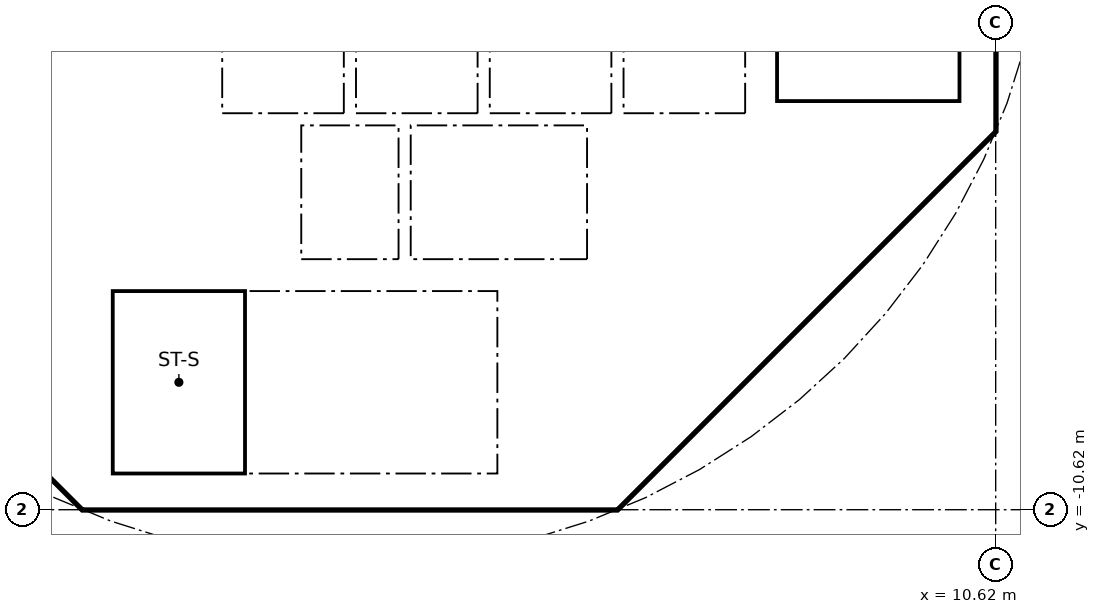
"""IFC4 building model, lengths in metres.
Left out: names, types, materials, properties, quantities, classifications, styles, units other than length and angle.
Written with IfcOpenShell. Run it as: python <this file> out.ifc"""

import sys

from ifc_helpers import new_model, si_unit, direction, frame, frame_2d, origin, place, context, subcontext, project, spatial, polyline, rectangle, outline, extrude, element, fill, save


model = new_model("IFC4")
c1 = context("Model", 3, precision=1e-05, world=origin(), true_north=direction((0.0, 1.0)))
c2 = subcontext(c1, "Body", "Model", "MODEL_VIEW")
j1 = project(units=[si_unit("LENGTHUNIT", "METRE"), si_unit("PLANEANGLEUNIT", "RADIAN")], contexts=[c1])
p1 = place(None, origin())
s1 = spatial("IfcSite", under=j1, at=p1, CompositionType="ELEMENT")
p2 = place(p1, origin())
s2 = spatial("IfcBuilding", under=s1, at=p2, CompositionType="ELEMENT")
p3 = place(p2, frame((0.0, 0.0, 252.9)))
s3 = spatial("IfcBuildingStorey", under=s2, at=p3, CompositionType="ELEMENT", Elevation=252.9)
p4 = place(p3, frame((-9.988, -4.613, 0.0), z_axis=(0.0, 0.0, 1.0), x_axis=(0.707106781187, -0.707106781187, 0.0)))
e1 = element("IfcWall", 1, at=p4, inside=s3, PredefinedType="SHEAR", context=c2, shape_type="SweptSolid", body=[
    extrude(rectangle(XDim=7.602, YDim=0.6, at=frame_2d((3.801, 0.0))), origin(), (0.0, 0.0, 1.0), 5.34),
])
p5 = place(p4, frame((6.151, 0.0, 0.0)))
e2 = element("IfcOpeningElement", 2, at=p5, cuts=e1, PredefinedType="OPENING", context=c2, shape_type="SweptSolid", body=[
    extrude(rectangle(XDim=1.1, YDim=2.1, at=frame_2d((0.55, 1.05))), frame((0.0, 0.31, 0.0), z_axis=(0.0, -1.0, 0.0), x_axis=(1.0, 0.0, 0.0)), (0.0, 0.0, 1.0), 0.62),
])
p6 = place(p3, frame((4.613, -9.988, 0.0), z_axis=(0.0, 0.0, 1.0), x_axis=(0.707106781187, 0.707106781187, 0.0)))
e3 = element("IfcWall", 3, at=p6, inside=s3, PredefinedType="SHEAR", context=c2, shape_type="SweptSolid", body=[
    extrude(rectangle(XDim=7.602, YDim=0.6, at=frame_2d((3.801, 0.0))), origin(), (0.0, 0.0, 1.0), 5.34),
])
p7 = place(p6, frame((3.201, 0.0, 0.0)))
e4 = element("IfcOpeningElement", 4, at=p7, cuts=e3, PredefinedType="OPENING", context=c2, shape_type="SweptSolid", body=[
    extrude(rectangle(XDim=1.2, YDim=2.1, at=frame_2d((0.6, 1.05))), frame((0.0, 0.31, 0.0), z_axis=(0.0, -1.0, 0.0), x_axis=(1.0, 0.0, 0.0)), (0.0, 0.0, 1.0), 0.62),
])
p8 = place(p3, frame((4.0, -10.025, 0.0), z_axis=(0.0, 0.0, 1.0), x_axis=(0.0, 1.0, 0.0)))
e5 = element("IfcWall", 5, at=p8, inside=s3, PredefinedType="SOLIDWALL", context=c2, shape_type="SweptSolid", body=[
    extrude(rectangle(XDim=3.0, YDim=0.2, at=frame_2d((1.5, 0.0))), origin(), (0.0, 0.0, 1.0), 5.34),
])
p9 = place(p8, frame((0.975, 0.0, 0.0)))
e6 = element("IfcOpeningElement", 6, at=p9, cuts=e5, PredefinedType="OPENING", context=c2, shape_type="SweptSolid", body=[
    extrude(rectangle(XDim=1.1, YDim=2.1, at=frame_2d((0.55, 1.05))), frame((0.0, 0.11, 0.0), z_axis=(0.0, -1.0, 0.0), x_axis=(1.0, 0.0, 0.0)), (0.0, 0.0, 1.0), 0.22),
])
p10 = place(p3, frame((4.0, -6.5, 0.0), z_axis=(0.0, 0.0, 1.0), x_axis=(0.0, 1.0, 0.0)))
e7 = element("IfcWall", 7, at=p10, inside=s3, PredefinedType="SOLIDWALL", context=c2, shape_type="SweptSolid", body=[
    extrude(rectangle(XDim=2.2, YDim=0.2, at=frame_2d((1.1, 0.0))), origin(), (0.0, 0.0, 1.0), 5.34),
])
p11 = place(p10, frame((0.55, 0.0, 0.0)))
e8 = element("IfcOpeningElement", 8, at=p11, cuts=e7, PredefinedType="OPENING", context=c2, shape_type="SweptSolid", body=[
    extrude(rectangle(XDim=1.1, YDim=2.1, at=frame_2d((0.55, 1.05))), frame((0.0, 0.11, 0.0), z_axis=(0.0, -1.0, 0.0), x_axis=(1.0, 0.0, 0.0)), (0.0, 0.0, 1.0), 0.22),
])
p12 = place(p3, frame((-4.0, -6.5, 0.0), z_axis=(0.0, 0.0, 1.0), x_axis=(0.0, 1.0, 0.0)))
e9 = element("IfcWall", 9, at=p12, inside=s3, PredefinedType="SOLIDWALL", context=c2, shape_type="SweptSolid", body=[
    extrude(rectangle(XDim=2.2, YDim=0.2, at=frame_2d((1.1, 0.0))), origin(), (0.0, 0.0, 1.0), 5.34),
])
p13 = place(p12, frame((0.65, 0.0, 0.0)))
e10 = element("IfcOpeningElement", 10, at=p13, cuts=e9, PredefinedType="OPENING", context=c2, shape_type="SweptSolid", body=[
    extrude(rectangle(XDim=0.9, YDim=2.1, at=frame_2d((0.45, 1.05))), frame((0.0, 0.11, 0.0), z_axis=(0.0, -1.0, 0.0), x_axis=(1.0, 0.0, 0.0)), (0.0, 0.0, 1.0), 0.22),
])
p14 = place(p3, origin())
e11 = element("IfcWall", 11, at=p14, inside=s3, PredefinedType="SHEAR", context=c2, shape_type="SweptSolid", body=[
    extrude(outline(polyline([(-4.152, -10.025), (4.152, -10.025), (4.401, -9.776), (4.825, -10.2), (4.401, -10.625), (-4.401, -10.625), (-4.825, -10.2), (-4.401, -9.776), (-4.152, -10.025)])), origin(), (0.0, 0.0, 1.0), 5.34),
])
p15 = place(p3, origin())
e12 = element("IfcWall", 12, at=p15, inside=s3, PredefinedType="SHEAR", context=c2, shape_type="SweptSolid", body=[
    extrude(outline(polyline([(9.776, -4.401), (10.025, -4.152), (10.025, -3.801), (10.025, 4.152), (9.776, 4.401), (10.2, 4.825), (10.625, 4.401), (10.625, -4.401), (10.2, -4.825), (9.776, -4.401)])), origin(), (0.0, 0.0, 1.0), 5.34),
])
for number, where, z_axis, x_axis in (
    (13, (-0.9, -6.5, 0.0), (0.0, 0.0, 1.0), (0.0, 1.0, 0.0)),
    (14, (0.9, -6.5, 0.0), (0.0, 0.0, 1.0), (0.0, 1.0, 0.0)),
):
    element("IfcWall", number, at=place(p3, frame(where, z_axis=z_axis, x_axis=x_axis)), inside=s3, PredefinedType="SOLIDWALL", context=c2, shape_type="SweptSolid", body=[
        extrude(rectangle(XDim=2.2, YDim=0.2, at=frame_2d((1.1, 0.0))), origin(), (0.0, 0.0, 1.0), 5.34),
    ])
p16 = place(p3, origin())
e15 = element("IfcWall", 15, at=p16, inside=s3, PredefinedType="SOLIDWALL", context=c2, shape_type="SweptSolid", body=[
    extrude(outline(polyline([(-6.7, -2.1), (-6.5, -2.1), (-6.5, -4.1), (-2.3, -4.1), (-2.3, -2.1), (-2.1, -2.1), (-2.1, -4.1), (-0.1, -4.1), (-0.1, -2.1), (0.1, -2.1), (0.1, -4.1), (2.1, -4.1), (2.1, -2.1), (2.3, -2.1), (2.3, -4.1), (4.3, -4.1), (4.3, -2.1), (4.5, -2.1), (4.5, -4.1), (6.5, -4.1), (6.5, -2.1), (6.7, -2.1), (6.7, -4.3), (-6.7, -4.3), (-6.7, -2.1)])), origin(), (0.0, 0.0, 1.0), 5.34),
])
p17 = place(p3, origin())
e16 = element("IfcWall", 16, at=p17, inside=s3, PredefinedType="SOLIDWALL", context=c2, shape_type="SweptSolid", body=[
    extrude(outline(polyline([(-3.9, -10.025), (-4.1, -10.025), (-4.1, -7.025), (-3.9, -7.025), (-3.9, -10.025)])), origin(), (0.0, 0.0, 1.0), 5.34),
])
p18 = place(p3, origin())
e17 = element("IfcWall", 17, at=p18, inside=s3, PredefinedType="SOLIDWALL", context=c2, shape_type="SweptSolid", body=[
    extrude(outline(polyline([(4.1, -7.025), (-4.1, -7.025), (-4.1, -6.5), (4.1, -6.5), (4.1, -7.025)])), origin(), (0.0, 0.0, 1.0), 5.34),
])
p19 = place(p3, origin())
e18 = element("IfcWall", 18, at=p19, inside=s3, PredefinedType="SOLIDWALL", context=c2, shape_type="SweptSolid", body=[
    extrude(outline(polyline([(7.025, -3.9), (6.7, -3.9), (6.7, 3.9), (7.025, 3.9), (7.025, -3.9)])), origin(), (0.0, 0.0, 1.0), 5.34),
])
p20 = place(p3, origin())
e19 = element("IfcWall", 19, at=p20, inside=s3, PredefinedType="SOLIDWALL", context=c2, shape_type="SweptSolid", body=[
    extrude(outline(polyline([(10.025, -4.1), (6.7, -4.1), (6.7, -3.9), (10.025, -3.9), (10.025, -4.1)])), origin(), (0.0, 0.0, 1.0), 5.34),
])
p21 = place(p3, frame((15.9, -6.48, 0.0), z_axis=(0.0, 0.0, 1.0), x_axis=(-0.70715799483, -0.707055563833, 0.0)))
e20 = element("IfcWall", 20, at=p21, inside=s3, PredefinedType="PARTITIONING", context=c2, shape_type="SweptSolid", body=[
    extrude(rectangle(XDim=9.534, YDim=0.15, at=frame_2d((4.767, 0.0))), origin(), (0.0, 0.0, 1.0), 5.34),
])
p22 = place(p21, frame((4.37, 0.0, 0.0)))
e21 = element("IfcOpeningElement", 21, at=p22, cuts=e20, PredefinedType="OPENING", context=c2, shape_type="SweptSolid", body=[
    extrude(rectangle(XDim=0.9, YDim=2.1, at=frame_2d((0.45, 1.05))), frame((0.0, 0.085, 0.0), z_axis=(0.0, -1.0, 0.0), x_axis=(1.0, 0.0, 0.0)), (0.0, 0.0, 1.0), 0.17),
])
p23 = place(p11, origin())
e22 = element("IfcDoor", 22, at=p23, inside=s3, OperationType="DOUBLE_DOOR_SLIDING", PredefinedType="DOOR", context=c2, shape_type="SweptSolid", body=[
    extrude(rectangle(XDim=1.1, YDim=2.1, at=frame_2d((0.55, 1.05))), frame((0.0, 0.025, 0.0), z_axis=(0.0, -1.0, 0.0), x_axis=(1.0, 0.0, 0.0)), (0.0, 0.0, 1.0), 0.05),
])
fill(e8, e22)
p24 = place(p9, origin())
e23 = element("IfcDoor", 23, at=p24, inside=s3, OperationType="SINGLE_SWING_RIGHT", PredefinedType="DOOR", context=c2, shape_type="SweptSolid", body=[
    extrude(rectangle(XDim=1.1, YDim=2.1, at=frame_2d((0.55, 1.05))), frame((0.0, 0.025, 0.0), z_axis=(0.0, -1.0, 0.0), x_axis=(1.0, 0.0, 0.0)), (0.0, 0.0, 1.0), 0.05),
])
fill(e6, e23)
p25 = place(p13, frame((0.9, 0.0, 0.0), x_axis=(-1.0, 0.0, 0.0)))
e24 = element("IfcDoor", 24, at=p25, inside=s3, OperationType="SINGLE_SWING_LEFT", PredefinedType="DOOR", context=c2, shape_type="SweptSolid", body=[
    extrude(rectangle(XDim=0.9, YDim=2.1, at=frame_2d((0.45, 1.05))), frame((0.0, 0.025, 0.0), z_axis=(0.0, -1.0, 0.0), x_axis=(1.0, 0.0, 0.0)), (0.0, 0.0, 1.0), 0.05),
])
fill(e10, e24)
p26 = place(p7, origin())
e25 = element("IfcDoor", 25, at=p26, inside=s3, OperationType="SINGLE_SWING_LEFT", PredefinedType="DOOR", context=c2, shape_type="SweptSolid", body=[
    extrude(rectangle(XDim=1.2, YDim=2.1, at=frame_2d((0.6, 1.05))), frame((0.0, 0.025, 0.0), z_axis=(0.0, -1.0, 0.0), x_axis=(1.0, 0.0, 0.0)), (0.0, 0.0, 1.0), 0.05),
])
fill(e4, e25)
p27 = place(p5, origin())
e26 = element("IfcDoor", 26, at=p27, inside=s3, OperationType="SINGLE_SWING_LEFT", PredefinedType="DOOR", context=c2, shape_type="SweptSolid", body=[
    extrude(rectangle(XDim=1.1, YDim=2.1, at=frame_2d((0.55, 1.05))), frame((0.0, 0.025, 0.0), z_axis=(0.0, -1.0, 0.0), x_axis=(1.0, 0.0, 0.0)), (0.0, 0.0, 1.0), 0.05),
])
fill(e2, e26)
save(model, sys.argv[1])
